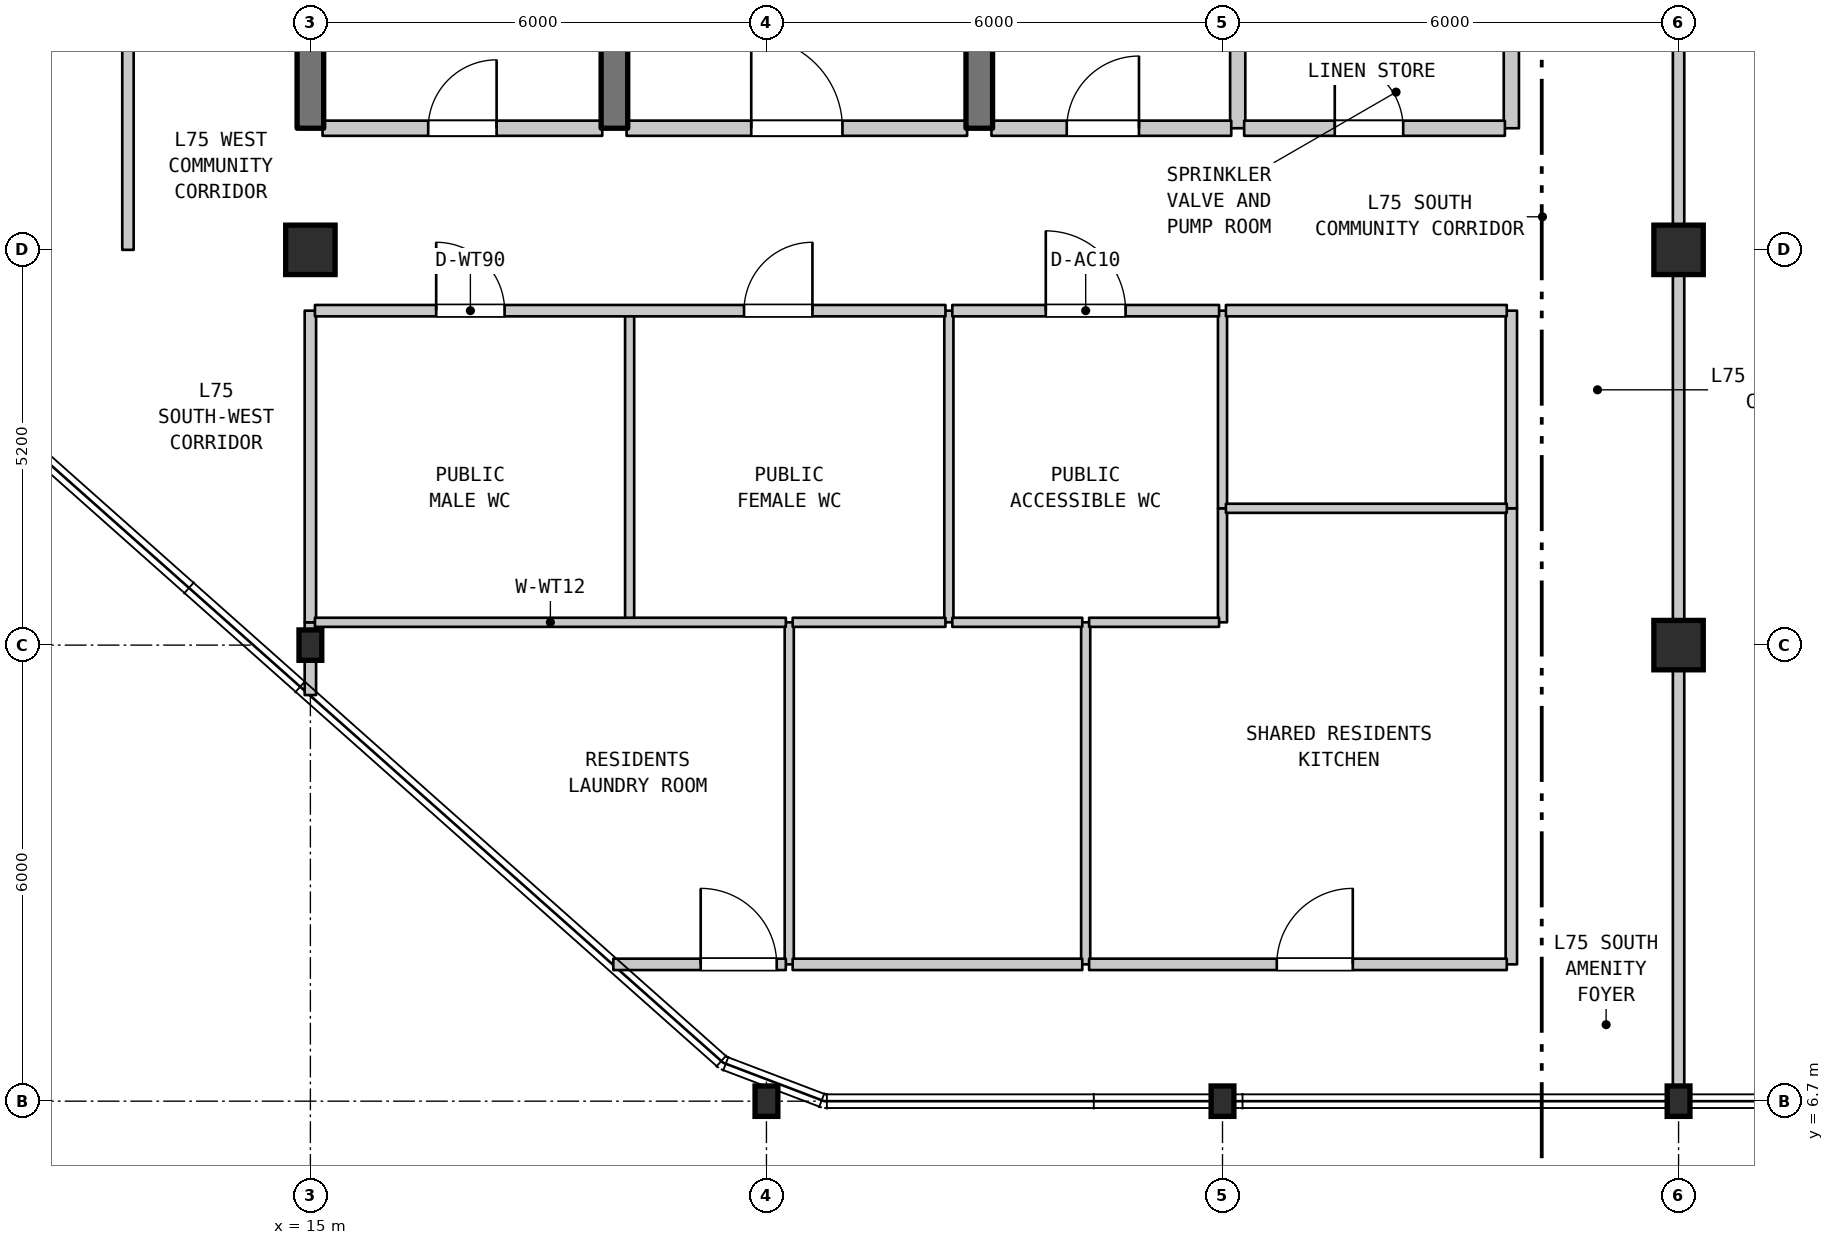
"""IFC4 building model, lengths in metres.
Left out: names, types, materials, properties, quantities, classifications, styles, units other than length and angle.
Written with IfcOpenShell. Run it as: python <this file> out.ifc"""

import sys

from ifc_helpers import new_model, si_unit, direction, frame, frame_2d, origin, origin_2d, place, context, subcontext, project, spatial, rectangle, i_section, extrude, element, fill, save


model = new_model("IFC4")
c1 = context("Model", 3, precision=1e-05, world=origin(), true_north=direction((0.0, 1.0)))
c2 = subcontext(c1, "Body", "Model", "MODEL_VIEW")
j1 = project(units=[si_unit("LENGTHUNIT", "METRE"), si_unit("PLANEANGLEUNIT", "RADIAN")], contexts=[c1])
p1 = place(None, origin())
s1 = spatial("IfcSite", under=j1, at=p1, CompositionType="ELEMENT")
p2 = place(p1, origin())
s2 = spatial("IfcBuilding", under=s1, at=p2, CompositionType="ELEMENT")
p3 = place(p2, frame((0.0, 0.0, 299.1)))
s3 = spatial("IfcBuildingStorey", under=s2, at=p3, CompositionType="ELEMENT", Elevation=299.1)
p4 = place(p3, frame((15.0, 12.7, 0.0), z_axis=(0.0, 0.0, 1.0), x_axis=(1.0, 0.0, 0.0)))
e1 = element("IfcColumn", 1, at=p4, inside=s3, PredefinedType="COLUMN", context=c2, shape_type="SweptSolid", body=[
    extrude(i_section(OverallWidth=0.3, OverallDepth=0.4, WebThickness=0.013, FlangeThickness=0.024, FilletRadius=0.027, at=origin_2d()), origin(), (0.0, 0.0, 1.0), 4.5),
])
p5 = place(p3, frame((15.0, 17.9, 0.0), z_axis=(0.0, 0.0, 1.0), x_axis=(1.0, 0.0, 0.0)))
e2 = element("IfcColumn", 2, at=p5, inside=s3, PredefinedType="COLUMN", context=c2, shape_type="SweptSolid", body=[
    extrude(rectangle(XDim=0.65, YDim=0.65, at=origin_2d()), origin(), (0.0, 0.0, 1.0), 4.5),
])
for number, where, z_axis, x_axis in (
    (3, (21.0, 6.7, 0.0), (0.0, 0.0, 1.0), (1.0, 0.0, 0.0)),
    (4, (27.0, 6.7, 0.0), (0.0, 0.0, 1.0), (1.0, 0.0, 0.0)),
    (5, (33.0, 6.7, 0.0), (0.0, 0.0, 1.0), (1.0, 0.0, 0.0)),
):
    element("IfcColumn", number, at=place(p3, frame(where, z_axis=z_axis, x_axis=x_axis)), inside=s3, PredefinedType="COLUMN", context=c2, shape_type="SweptSolid", body=[
        extrude(i_section(OverallWidth=0.3, OverallDepth=0.4, WebThickness=0.013, FlangeThickness=0.024, FilletRadius=0.027, at=origin_2d()), origin(), (0.0, 0.0, 1.0), 4.5),
    ])
for number, where, z_axis, x_axis in (
    (6, (33.0, 12.7, 0.0), (0.0, 0.0, 1.0), (1.0, 0.0, 0.0)),
    (7, (33.0, 17.9, 0.0), (0.0, 0.0, 1.0), (1.0, 0.0, 0.0)),
):
    element("IfcColumn", number, at=place(p3, frame(where, z_axis=z_axis, x_axis=x_axis)), inside=s3, PredefinedType="COLUMN", context=c2, shape_type="SweptSolid", body=[
        extrude(rectangle(XDim=0.65, YDim=0.65, at=origin_2d()), origin(), (0.0, 0.0, 1.0), 4.5),
    ])
p6 = place(p3, frame((12.6, 17.9, 0.0), z_axis=(0.0, 0.0, 1.0), x_axis=(0.0, 1.0, 0.0)))
e8 = element("IfcWall", 8, at=p6, inside=s3, PredefinedType="STANDARD", context=c2, shape_type="SweptSolid", body=[
    extrude(rectangle(XDim=20.0, YDim=0.15, at=frame_2d((10.0, 0.0))), origin(), (0.0, 0.0, 1.0), 4.19),
])
p7 = place(p6, frame((9.1, 0.0, 0.0)))
e9 = element("IfcOpeningElement", 9, at=p7, cuts=e8, PredefinedType="OPENING", context=c2, shape_type="SweptSolid", body=[
    extrude(rectangle(XDim=1.0, YDim=2.15, at=frame_2d((0.5, 1.075))), frame((0.0, 0.085, 0.0), z_axis=(0.0, -1.0, 0.0), x_axis=(1.0, 0.0, 0.0)), (0.0, 0.0, 1.0), 0.17),
])
p8 = place(p3, frame((15.0, 12.043, 0.0), z_axis=(0.0, 0.0, 1.0), x_axis=(0.0, 1.0, 0.0)))
e10 = element("IfcWall", 10, at=p8, inside=s3, PredefinedType="STANDARD", context=c2, shape_type="SweptSolid", body=[
    extrude(rectangle(XDim=0.957, YDim=0.15, at=frame_2d((0.479, 0.0))), origin(), (0.0, 0.0, 1.0), 4.19),
])
p9 = place(p3, frame((15.0, 13.0, 0.0), z_axis=(0.0, 0.0, 1.0), x_axis=(0.0, 1.0, 0.0)))
e11 = element("IfcWall", 11, at=p9, inside=s3, PredefinedType="STANDARD", context=c2, shape_type="SweptSolid", body=[
    extrude(rectangle(XDim=4.1, YDim=0.15, at=frame_2d((2.05, 0.0))), origin(), (0.0, 0.0, 1.0), 3.9),
])
for number, where, z_axis, x_axis in (
    (12, (15.0, 19.5, 0.0), (0.0, 0.0, 1.0), (0.0, 1.0, 0.0)),
    (13, (19.0, 19.5, 0.0), (0.0, 0.0, 1.0), (0.0, 1.0, 0.0)),
):
    element("IfcWall", number, at=place(p3, frame(where, z_axis=z_axis, x_axis=x_axis)), inside=s3, PredefinedType="SHEAR", context=c2, shape_type="SweptSolid", body=[
        extrude(rectangle(XDim=3.2, YDim=0.35, at=frame_2d((1.6, 0.0))), origin(), (0.0, 0.0, 1.0), 4.19),
    ])
p10 = place(p3, frame((19.2, 13.0, 0.0), z_axis=(0.0, 0.0, 1.0), x_axis=(0.0, 1.0, 0.0)))
e14 = element("IfcWall", 14, at=p10, inside=s3, PredefinedType="PARTITIONING", context=c2, shape_type="SweptSolid", body=[
    extrude(rectangle(XDim=4.1, YDim=0.12, at=frame_2d((2.05, 0.0))), origin(), (0.0, 0.0, 1.0), 4.19),
])
p11 = place(p3, frame((21.3, 8.5, 0.0), z_axis=(0.0, 0.0, 1.0), x_axis=(0.0, 1.0, 0.0)))
e15 = element("IfcWall", 15, at=p11, inside=s3, PredefinedType="PARTITIONING", context=c2, shape_type="SweptSolid", body=[
    extrude(rectangle(XDim=4.5, YDim=0.12, at=frame_2d((2.25, 0.0))), origin(), (0.0, 0.0, 1.0), 4.19),
])
p12 = place(p3, frame((23.4, 13.0, 0.0), z_axis=(0.0, 0.0, 1.0), x_axis=(0.0, 1.0, 0.0)))
e16 = element("IfcWall", 16, at=p12, inside=s3, PredefinedType="PARTITIONING", context=c2, shape_type="SweptSolid", body=[
    extrude(rectangle(XDim=4.1, YDim=0.12, at=frame_2d((2.05, 0.0))), origin(), (0.0, 0.0, 1.0), 4.19),
])
p13 = place(p3, frame((23.8, 19.5, 0.0), z_axis=(0.0, 0.0, 1.0), x_axis=(0.0, 1.0, 0.0)))
e17 = element("IfcWall", 17, at=p13, inside=s3, PredefinedType="SHEAR", context=c2, shape_type="SweptSolid", body=[
    extrude(rectangle(XDim=3.2, YDim=0.35, at=frame_2d((1.6, 0.0))), origin(), (0.0, 0.0, 1.0), 4.19),
])
p14 = place(p3, frame((25.2, 8.5, 0.0), z_axis=(0.0, 0.0, 1.0), x_axis=(0.0, 1.0, 0.0)))
e18 = element("IfcWall", 18, at=p14, inside=s3, PredefinedType="PARTITIONING", context=c2, shape_type="SweptSolid", body=[
    extrude(rectangle(XDim=4.5, YDim=0.12, at=frame_2d((2.25, 0.0))), origin(), (0.0, 0.0, 1.0), 4.19),
])
p15 = place(p3, frame((27.0, 13.0, 0.0), z_axis=(0.0, 0.0, 1.0), x_axis=(0.0, 1.0, 0.0)))
e19 = element("IfcWall", 19, at=p15, inside=s3, PredefinedType="PARTITIONING", context=c2, shape_type="SweptSolid", body=[
    extrude(rectangle(XDim=1.5, YDim=0.12, at=frame_2d((0.75, 0.0))), origin(), (0.0, 0.0, 1.0), 4.19),
])
p16 = place(p3, frame((27.0, 14.5, 0.0), z_axis=(0.0, 0.0, 1.0), x_axis=(0.0, 1.0, 0.0)))
e20 = element("IfcWall", 20, at=p16, inside=s3, PredefinedType="PARTITIONING", context=c2, shape_type="SweptSolid", body=[
    extrude(rectangle(XDim=2.6, YDim=0.12, at=frame_2d((1.3, 0.0))), origin(), (0.0, 0.0, 1.0), 4.19),
])
p17 = place(p3, frame((27.2, 19.5, 0.0), z_axis=(0.0, 0.0, 1.0), x_axis=(0.0, 1.0, 0.0)))
e21 = element("IfcWall", 21, at=p17, inside=s3, PredefinedType="STANDARD", context=c2, shape_type="SweptSolid", body=[
    extrude(rectangle(XDim=1.6, YDim=0.2, at=frame_2d((0.8, 0.0))), origin(), (0.0, 0.0, 1.0), 4.19),
])
p18 = place(p3, frame((30.8, 8.5, 0.0), z_axis=(0.0, 0.0, 1.0), x_axis=(0.0, 1.0, 0.0)))
e22 = element("IfcWall", 22, at=p18, inside=s3, PredefinedType="STANDARD", context=c2, shape_type="SweptSolid", body=[
    extrude(rectangle(XDim=6.0, YDim=0.15, at=frame_2d((3.0, 0.0))), origin(), (0.0, 0.0, 1.0), 4.19),
])
p19 = place(p3, frame((30.8, 14.5, 0.0), z_axis=(0.0, 0.0, 1.0), x_axis=(0.0, 1.0, 0.0)))
e23 = element("IfcWall", 23, at=p19, inside=s3, PredefinedType="STANDARD", context=c2, shape_type="SweptSolid", body=[
    extrude(rectangle(XDim=2.6, YDim=0.15, at=frame_2d((1.3, 0.0))), origin(), (0.0, 0.0, 1.0), 4.19),
])
p20 = place(p3, frame((30.8, 19.5, 0.0), z_axis=(0.0, 0.0, 1.0), x_axis=(0.0, 1.0, 0.0)))
e24 = element("IfcWall", 24, at=p20, inside=s3, PredefinedType="STANDARD", context=c2, shape_type="SweptSolid", body=[
    extrude(rectangle(XDim=1.6, YDim=0.2, at=frame_2d((0.8, 0.0))), origin(), (0.0, 0.0, 1.0), 4.19),
])
p21 = place(p3, frame((33.0, 6.71, 0.0), z_axis=(0.0, 0.0, 1.0), x_axis=(0.0, 1.0, 0.0)))
e25 = element("IfcWall", 25, at=p21, inside=s3, PredefinedType="STANDARD", context=c2, shape_type="SweptSolid", body=[
    extrude(rectangle(XDim=19.19, YDim=0.15, at=frame_2d((9.595, 0.0))), origin(), (0.0, 0.0, 1.0), 3.9),
])
p22 = place(p3, frame((18.985, 8.5, 0.0), z_axis=(0.0, 0.0, 1.0), x_axis=(1.0, 0.0, 0.0)))
e26 = element("IfcWall", 26, at=p22, inside=s3, PredefinedType="STANDARD", context=c2, shape_type="SweptSolid", body=[
    extrude(rectangle(XDim=2.27, YDim=0.15, at=frame_2d((1.135, 0.0))), origin(), (0.0, 0.0, 1.0), 4.19),
])
p23 = place(p22, frame((1.15, 0.0, 0.0)))
e27 = element("IfcOpeningElement", 27, at=p23, cuts=e26, PredefinedType="OPENING", context=c2, shape_type="SweptSolid", body=[
    extrude(rectangle(XDim=1.0, YDim=2.15, at=frame_2d((0.5, 1.075))), frame((0.0, 0.085, 0.0), z_axis=(0.0, -1.0, 0.0), x_axis=(1.0, 0.0, 0.0)), (0.0, 0.0, 1.0), 0.17),
])
p24 = place(p3, frame((21.345, 8.5, 0.0), z_axis=(0.0, 0.0, 1.0), x_axis=(1.0, 0.0, 0.0)))
e28 = element("IfcWall", 28, at=p24, inside=s3, PredefinedType="STANDARD", context=c2, shape_type="SweptSolid", body=[
    extrude(rectangle(XDim=3.81, YDim=0.15, at=frame_2d((1.905, 0.0))), origin(), (0.0, 0.0, 1.0), 4.19),
])
p25 = place(p3, frame((25.245, 8.5, 0.0), z_axis=(0.0, 0.0, 1.0), x_axis=(1.0, 0.0, 0.0)))
e29 = element("IfcWall", 29, at=p25, inside=s3, PredefinedType="STANDARD", context=c2, shape_type="SweptSolid", body=[
    extrude(rectangle(XDim=5.495, YDim=0.15, at=frame_2d((2.748, 0.0))), origin(), (0.0, 0.0, 1.0), 4.19),
])
p26 = place(p25, frame((2.469, 0.0, 0.0)))
e30 = element("IfcOpeningElement", 30, at=p26, cuts=e29, PredefinedType="OPENING", context=c2, shape_type="SweptSolid", body=[
    extrude(rectangle(XDim=1.0, YDim=2.15, at=frame_2d((0.5, 1.075))), frame((0.0, 0.085, 0.0), z_axis=(0.0, -1.0, 0.0), x_axis=(1.0, 0.0, 0.0)), (0.0, 0.0, 1.0), 0.17),
])
p27 = place(p3, frame((15.06, 13.0, 0.0), z_axis=(0.0, 0.0, 1.0), x_axis=(1.0, 0.0, 0.0)))
e31 = element("IfcWall", 31, at=p27, inside=s3, PredefinedType="PARTITIONING", context=c2, shape_type="SweptSolid", body=[
    extrude(rectangle(XDim=6.195, YDim=0.12, at=frame_2d((3.097, 0.0))), origin(), (0.0, 0.0, 1.0), 4.19),
])
p28 = place(p3, frame((21.345, 13.0, 0.0), z_axis=(0.0, 0.0, 1.0), x_axis=(1.0, 0.0, 0.0)))
e32 = element("IfcWall", 32, at=p28, inside=s3, PredefinedType="PARTITIONING", context=c2, shape_type="SweptSolid", body=[
    extrude(rectangle(XDim=2.01, YDim=0.12, at=frame_2d((1.005, 0.0))), origin(), (0.0, 0.0, 1.0), 4.19),
])
for number, where, z_axis, x_axis in (
    (33, (23.445, 13.0, 0.0), (0.0, 0.0, 1.0), (1.0, 0.0, 0.0)),
    (34, (25.245, 13.0, 0.0), (0.0, 0.0, 1.0), (1.0, 0.0, 0.0)),
):
    element("IfcWall", number, at=place(p3, frame(where, z_axis=z_axis, x_axis=x_axis)), inside=s3, PredefinedType="PARTITIONING", context=c2, shape_type="SweptSolid", body=[
        extrude(rectangle(XDim=1.71, YDim=0.12, at=frame_2d((0.855, 0.0))), origin(), (0.0, 0.0, 1.0), 4.19),
    ])
p29 = place(p3, frame((27.045, 14.5, 0.0), z_axis=(0.0, 0.0, 1.0), x_axis=(1.0, 0.0, 0.0)))
e35 = element("IfcWall", 35, at=p29, inside=s3, PredefinedType="PARTITIONING", context=c2, shape_type="SweptSolid", body=[
    extrude(rectangle(XDim=3.695, YDim=0.12, at=frame_2d((1.848, 0.0))), origin(), (0.0, 0.0, 1.0), 4.19),
])
p30 = place(p3, frame((15.06, 17.1, 0.0), z_axis=(0.0, 0.0, 1.0), x_axis=(1.0, 0.0, 0.0)))
e36 = element("IfcWall", 36, at=p30, inside=s3, PredefinedType="STANDARD", context=c2, shape_type="SweptSolid", body=[
    extrude(rectangle(XDim=8.295, YDim=0.15, at=frame_2d((4.147, 0.0))), origin(), (0.0, 0.0, 1.0), 4.19),
])
p31 = place(p30, frame((1.595, 0.0, 0.0)))
e37 = element("IfcOpeningElement", 37, at=p31, cuts=e36, PredefinedType="OPENING", context=c2, shape_type="SweptSolid", body=[
    extrude(rectangle(XDim=0.9, YDim=2.1, at=frame_2d((0.45, 1.05))), frame((0.0, 0.085, 0.0), z_axis=(0.0, -1.0, 0.0), x_axis=(1.0, 0.0, 0.0)), (0.0, 0.0, 1.0), 0.17),
])
p32 = place(p30, frame((5.645, 0.0, 0.0)))
e38 = element("IfcOpeningElement", 38, at=p32, cuts=e36, PredefinedType="OPENING", context=c2, shape_type="SweptSolid", body=[
    extrude(rectangle(XDim=0.9, YDim=2.1, at=frame_2d((0.45, 1.05))), frame((0.0, 0.085, 0.0), z_axis=(0.0, -1.0, 0.0), x_axis=(1.0, 0.0, 0.0)), (0.0, 0.0, 1.0), 0.17),
])
p33 = place(p3, frame((23.445, 17.1, 0.0), z_axis=(0.0, 0.0, 1.0), x_axis=(1.0, 0.0, 0.0)))
e39 = element("IfcWall", 39, at=p33, inside=s3, PredefinedType="STANDARD", context=c2, shape_type="SweptSolid", body=[
    extrude(rectangle(XDim=3.51, YDim=0.15, at=frame_2d((1.755, 0.0))), origin(), (0.0, 0.0, 1.0), 4.19),
])
p34 = place(p33, frame((1.23, 0.0, 0.0)))
e40 = element("IfcOpeningElement", 40, at=p34, cuts=e39, PredefinedType="OPENING", context=c2, shape_type="SweptSolid", body=[
    extrude(rectangle(XDim=1.05, YDim=2.15, at=frame_2d((0.525, 1.075))), frame((0.0, 0.085, 0.0), z_axis=(0.0, -1.0, 0.0), x_axis=(1.0, 0.0, 0.0)), (0.0, 0.0, 1.0), 0.17),
])
p35 = place(p3, frame((27.045, 17.1, 0.0), z_axis=(0.0, 0.0, 1.0), x_axis=(1.0, 0.0, 0.0)))
e41 = element("IfcWall", 41, at=p35, inside=s3, PredefinedType="STANDARD", context=c2, shape_type="SweptSolid", body=[
    extrude(rectangle(XDim=3.695, YDim=0.15, at=frame_2d((1.848, 0.0))), origin(), (0.0, 0.0, 1.0), 4.19),
])
p36 = place(p3, frame((15.16, 19.5, 0.0), z_axis=(0.0, 0.0, 1.0), x_axis=(1.0, 0.0, 0.0)))
e42 = element("IfcWall", 42, at=p36, inside=s3, PredefinedType="STANDARD", context=c2, shape_type="SweptSolid", body=[
    extrude(rectangle(XDim=3.68, YDim=0.2, at=frame_2d((1.84, 0.0))), origin(), (0.0, 0.0, 1.0), 4.19),
])
p37 = place(p36, frame((1.39, 0.0, 0.0)))
e43 = element("IfcOpeningElement", 43, at=p37, cuts=e42, PredefinedType="OPENING", context=c2, shape_type="SweptSolid", body=[
    extrude(rectangle(XDim=0.9, YDim=2.15, at=frame_2d((0.45, 1.075))), frame((0.0, 0.11, 0.0), z_axis=(0.0, -1.0, 0.0), x_axis=(1.0, 0.0, 0.0)), (0.0, 0.0, 1.0), 0.22),
])
p38 = place(p3, frame((19.16, 19.5, 0.0), z_axis=(0.0, 0.0, 1.0), x_axis=(1.0, 0.0, 0.0)))
e44 = element("IfcWall", 44, at=p38, inside=s3, PredefinedType="STANDARD", context=c2, shape_type="SweptSolid", body=[
    extrude(rectangle(XDim=4.48, YDim=0.2, at=frame_2d((2.24, 0.0))), origin(), (0.0, 0.0, 1.0), 4.19),
])
p39 = place(p38, frame((1.64, 0.0, 0.0)))
e45 = element("IfcOpeningElement", 45, at=p39, cuts=e44, PredefinedType="OPENING", context=c2, shape_type="SweptSolid", body=[
    extrude(rectangle(XDim=1.2, YDim=2.2, at=frame_2d((0.6, 1.1))), frame((0.0, 0.11, 0.0), z_axis=(0.0, -1.0, 0.0), x_axis=(1.0, 0.0, 0.0)), (0.0, 0.0, 1.0), 0.22),
])
p40 = place(p3, frame((23.96, 19.5, 0.0), z_axis=(0.0, 0.0, 1.0), x_axis=(1.0, 0.0, 0.0)))
e46 = element("IfcWall", 46, at=p40, inside=s3, PredefinedType="STANDARD", context=c2, shape_type="SweptSolid", body=[
    extrude(rectangle(XDim=3.155, YDim=0.2, at=frame_2d((1.578, 0.0))), origin(), (0.0, 0.0, 1.0), 4.19),
])
p41 = place(p40, frame((0.991, 0.0, 0.0)))
e47 = element("IfcOpeningElement", 47, at=p41, cuts=e46, PredefinedType="OPENING", context=c2, shape_type="SweptSolid", body=[
    extrude(rectangle(XDim=0.95, YDim=2.15, at=frame_2d((0.475, 1.075))), frame((0.0, 0.11, 0.0), z_axis=(0.0, -1.0, 0.0), x_axis=(1.0, 0.0, 0.0)), (0.0, 0.0, 1.0), 0.22),
])
p42 = place(p3, frame((27.285, 19.5, 0.0), z_axis=(0.0, 0.0, 1.0), x_axis=(1.0, 0.0, 0.0)))
e48 = element("IfcWall", 48, at=p42, inside=s3, PredefinedType="STANDARD", context=c2, shape_type="SweptSolid", body=[
    extrude(rectangle(XDim=3.43, YDim=0.2, at=frame_2d((1.715, 0.0))), origin(), (0.0, 0.0, 1.0), 4.19),
])
p43 = place(p42, frame((1.192, 0.0, 0.0)))
e49 = element("IfcOpeningElement", 49, at=p43, cuts=e48, PredefinedType="OPENING", context=c2, shape_type="SweptSolid", body=[
    extrude(rectangle(XDim=0.9, YDim=2.15, at=frame_2d((0.45, 1.075))), frame((0.0, 0.11, 0.0), z_axis=(0.0, -1.0, 0.0), x_axis=(1.0, 0.0, 0.0)), (0.0, 0.0, 1.0), 0.22),
])
p44 = place(p23, origin())
e50 = element("IfcDoor", 50, at=p44, inside=s3, OperationType="SINGLE_SWING_LEFT", PredefinedType="DOOR", context=c2, shape_type="SweptSolid", body=[
    extrude(rectangle(XDim=1.0, YDim=2.15, at=frame_2d((0.5, 1.075))), frame((0.0, 0.025, 0.0), z_axis=(0.0, -1.0, 0.0), x_axis=(1.0, 0.0, 0.0)), (0.0, 0.0, 1.0), 0.05),
])
fill(e27, e50)
p45 = place(p26, origin())
e51 = element("IfcDoor", 51, at=p45, inside=s3, OperationType="SINGLE_SWING_RIGHT", PredefinedType="DOOR", context=c2, shape_type="SweptSolid", body=[
    extrude(rectangle(XDim=1.0, YDim=2.15, at=frame_2d((0.5, 1.075))), frame((0.0, 0.025, 0.0), z_axis=(0.0, -1.0, 0.0), x_axis=(1.0, 0.0, 0.0)), (0.0, 0.0, 1.0), 0.05),
])
fill(e30, e51)
p46 = place(p31, origin())
e52 = element("IfcDoor", 52, at=p46, inside=s3, OperationType="SINGLE_SWING_LEFT", PredefinedType="DOOR", context=c2, shape_type="SweptSolid", body=[
    extrude(rectangle(XDim=0.9, YDim=2.1, at=frame_2d((0.45, 1.05))), frame((0.0, 0.025, 0.0), z_axis=(0.0, -1.0, 0.0), x_axis=(1.0, 0.0, 0.0)), (0.0, 0.0, 1.0), 0.05),
])
fill(e37, e52)
p47 = place(p32, origin())
e53 = element("IfcDoor", 53, at=p47, inside=s3, OperationType="SINGLE_SWING_RIGHT", PredefinedType="DOOR", context=c2, shape_type="SweptSolid", body=[
    extrude(rectangle(XDim=0.9, YDim=2.1, at=frame_2d((0.45, 1.05))), frame((0.0, 0.025, 0.0), z_axis=(0.0, -1.0, 0.0), x_axis=(1.0, 0.0, 0.0)), (0.0, 0.0, 1.0), 0.05),
])
fill(e38, e53)
p48 = place(p34, origin())
e54 = element("IfcDoor", 54, at=p48, inside=s3, OperationType="SINGLE_SWING_LEFT", PredefinedType="DOOR", context=c2, shape_type="SweptSolid", body=[
    extrude(rectangle(XDim=1.05, YDim=2.15, at=frame_2d((0.525, 1.075))), frame((0.0, 0.025, 0.0), z_axis=(0.0, -1.0, 0.0), x_axis=(1.0, 0.0, 0.0)), (0.0, 0.0, 1.0), 0.05),
])
fill(e40, e54)
p49 = place(p37, origin())
e55 = element("IfcDoor", 55, at=p49, inside=s3, OperationType="SINGLE_SWING_RIGHT", PredefinedType="DOOR", context=c2, shape_type="SweptSolid", body=[
    extrude(rectangle(XDim=0.9, YDim=2.15, at=frame_2d((0.45, 1.075))), frame((0.0, 0.025, 0.0), z_axis=(0.0, -1.0, 0.0), x_axis=(1.0, 0.0, 0.0)), (0.0, 0.0, 1.0), 0.05),
])
fill(e43, e55)
p50 = place(p39, origin())
e56 = element("IfcDoor", 56, at=p50, inside=s3, OperationType="SINGLE_SWING_LEFT", PredefinedType="DOOR", context=c2, shape_type="SweptSolid", body=[
    extrude(rectangle(XDim=1.2, YDim=2.2, at=frame_2d((0.6, 1.1))), frame((0.0, 0.025, 0.0), z_axis=(0.0, -1.0, 0.0), x_axis=(1.0, 0.0, 0.0)), (0.0, 0.0, 1.0), 0.05),
])
fill(e45, e56)
p51 = place(p41, origin())
e57 = element("IfcDoor", 57, at=p51, inside=s3, OperationType="SINGLE_SWING_RIGHT", PredefinedType="DOOR", context=c2, shape_type="SweptSolid", body=[
    extrude(rectangle(XDim=0.95, YDim=2.15, at=frame_2d((0.475, 1.075))), frame((0.0, 0.025, 0.0), z_axis=(0.0, -1.0, 0.0), x_axis=(1.0, 0.0, 0.0)), (0.0, 0.0, 1.0), 0.05),
])
fill(e47, e57)
p52 = place(p43, origin())
e58 = element("IfcDoor", 58, at=p52, inside=s3, OperationType="SINGLE_SWING_LEFT", PredefinedType="DOOR", context=c2, shape_type="SweptSolid", body=[
    extrude(rectangle(XDim=0.9, YDim=2.15, at=frame_2d((0.45, 1.075))), frame((0.0, 0.025, 0.0), z_axis=(0.0, -1.0, 0.0), x_axis=(1.0, 0.0, 0.0)), (0.0, 0.0, 1.0), 0.05),
])
fill(e49, e58)
save(model, sys.argv[1])
